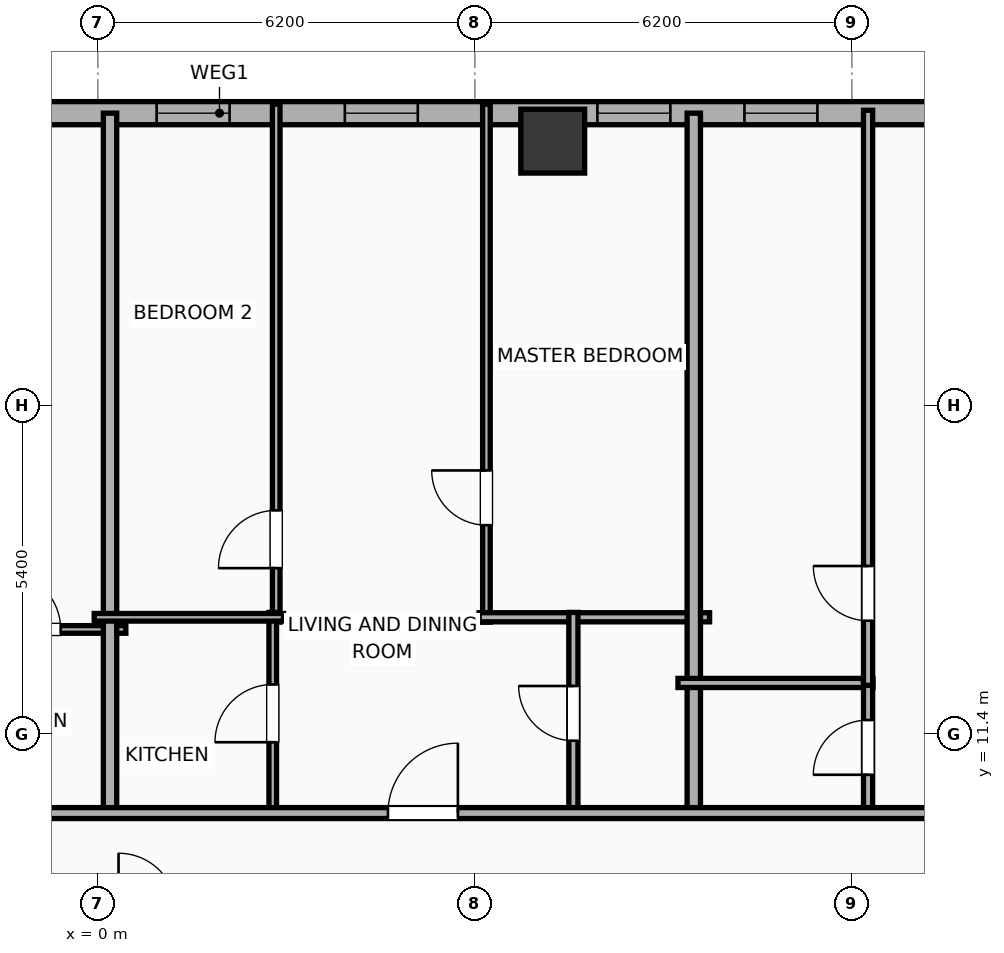
"""IFC4 building model, lengths in metres.
Left out: names, types, materials, properties, quantities, classifications, styles, units other than length and angle.
Written with IfcOpenShell. Run it as: python <this file> out.ifc"""

import sys

from ifc_helpers import new_model, si_unit, direction, frame, frame_2d, origin, origin_2d, place, context, subcontext, project, spatial, rectangle, hollow_rectangle, extrude, element, fill, save


model = new_model("IFC4")
c1 = context("Model", 3, precision=1e-05, world=origin(), true_north=direction((0.0, 1.0)))
c2 = subcontext(c1, "Body", "Model", "MODEL_VIEW")
j1 = project(units=[si_unit("LENGTHUNIT", "METRE"), si_unit("PLANEANGLEUNIT", "RADIAN")], contexts=[c1])
p1 = place(None, origin())
s1 = spatial("IfcSite", under=j1, at=p1, CompositionType="ELEMENT")
p2 = place(p1, origin())
s2 = spatial("IfcBuilding", under=s1, at=p2, CompositionType="ELEMENT")
p3 = place(p2, frame((0.0, 0.0, 101.4)))
s3 = spatial("IfcBuildingStorey", under=s2, at=p3, CompositionType="ELEMENT", Elevation=101.4)
p4 = place(p3, frame((7.48, 21.15, 0.0), z_axis=(0.0, 0.0, 1.0), x_axis=(1.0, 0.0, 0.0)))
e1 = element("IfcColumn", 1, at=p4, inside=s3, PredefinedType="COLUMN", context=c2, shape_type="SweptSolid", body=[
    extrude(hollow_rectangle(XDim=1.05, YDim=1.05, WallThickness=0.036, at=origin_2d()), origin(), (0.0, 0.0, 1.0), 3.9),
])
p5 = place(p3, frame((-25.381, 21.61, 0.0), z_axis=(0.0, 0.0, 1.0), x_axis=(1.0, 0.0, 0.0)))
e2 = element("IfcWall", 2, at=p5, inside=s3, PredefinedType="ELEMENTEDWALL", context=c2, shape_type="SweptSolid", body=[
    extrude(rectangle(XDim=54.763, YDim=0.38, at=frame_2d((27.381, 0.0))), origin(), (0.0, 0.0, 1.0), 3.65),
])
p6 = place(p5, frame((45.067, 0.0, 0.75)))
e3 = element("IfcOpeningElement", 3, at=p6, cuts=e2, PredefinedType="OPENING", context=c2, shape_type="SweptSolid", body=[
    extrude(rectangle(XDim=2.4, YDim=2.1, at=frame_2d((1.2, 1.05))), frame((0.0, 0.2, 0.0), z_axis=(0.0, -1.0, 0.0), x_axis=(1.0, 0.0, 0.0)), (0.0, 0.0, 1.0), 0.4),
])
p7 = place(p5, frame((4.076, 0.0, 0.75)))
e4 = element("IfcOpeningElement", 4, at=p7, cuts=e2, PredefinedType="OPENING", context=c2, shape_type="SweptSolid", body=[
    extrude(rectangle(XDim=1.2, YDim=2.05, at=frame_2d((0.6, 1.025))), frame((0.0, 0.2, 0.0), z_axis=(0.0, -1.0, 0.0), x_axis=(1.0, 0.0, 0.0)), (0.0, 0.0, 1.0), 0.4),
])
p8 = place(p5, frame((9.395, 0.0, 0.75)))
e5 = element("IfcOpeningElement", 5, at=p8, cuts=e2, PredefinedType="OPENING", context=c2, shape_type="SweptSolid", body=[
    extrude(rectangle(XDim=0.85, YDim=2.05, at=frame_2d((0.425, 1.025))), frame((0.0, 0.2, 0.0), z_axis=(0.0, -1.0, 0.0), x_axis=(1.0, 0.0, 0.0)), (0.0, 0.0, 1.0), 0.4),
])
p9 = place(p5, frame((7.205, 0.0, 0.75)))
e6 = element("IfcOpeningElement", 6, at=p9, cuts=e2, PredefinedType="OPENING", context=c2, shape_type="SweptSolid", body=[
    extrude(rectangle(XDim=1.2, YDim=2.05, at=frame_2d((0.6, 1.025))), frame((0.0, 0.2, 0.0), z_axis=(0.0, -1.0, 0.0), x_axis=(1.0, 0.0, 0.0)), (0.0, 0.0, 1.0), 0.4),
])
p10 = place(p5, frame((13.676, 0.0, 0.75)))
e7 = element("IfcOpeningElement", 7, at=p10, cuts=e2, PredefinedType="OPENING", context=c2, shape_type="SweptSolid", body=[
    extrude(rectangle(XDim=1.2, YDim=2.05, at=frame_2d((0.6, 1.025))), frame((0.0, 0.2, 0.0), z_axis=(0.0, -1.0, 0.0), x_axis=(1.0, 0.0, 0.0)), (0.0, 0.0, 1.0), 0.4),
])
p11 = place(p5, frame((17.136, 0.0, 0.75)))
e8 = element("IfcOpeningElement", 8, at=p11, cuts=e2, PredefinedType="OPENING", context=c2, shape_type="SweptSolid", body=[
    extrude(rectangle(XDim=1.2, YDim=2.05, at=frame_2d((0.6, 1.025))), frame((0.0, 0.2, 0.0), z_axis=(0.0, -1.0, 0.0), x_axis=(1.0, 0.0, 0.0)), (0.0, 0.0, 1.0), 0.4),
])
p12 = place(p5, frame((22.656, 0.0, 0.75)))
e9 = element("IfcOpeningElement", 9, at=p12, cuts=e2, PredefinedType="OPENING", context=c2, shape_type="SweptSolid", body=[
    extrude(rectangle(XDim=1.2, YDim=2.05, at=frame_2d((0.6, 1.025))), frame((0.0, 0.2, 0.0), z_axis=(0.0, -1.0, 0.0), x_axis=(1.0, 0.0, 0.0)), (0.0, 0.0, 1.0), 0.4),
])
p13 = place(p5, frame((29.443, 0.0, 0.75)))
e10 = element("IfcOpeningElement", 10, at=p13, cuts=e2, PredefinedType="OPENING", context=c2, shape_type="SweptSolid", body=[
    extrude(rectangle(XDim=1.2, YDim=2.05, at=frame_2d((0.6, 1.025))), frame((0.0, 0.2, 0.0), z_axis=(0.0, -1.0, 0.0), x_axis=(1.0, 0.0, 0.0)), (0.0, 0.0, 1.0), 0.4),
])
p14 = place(p5, frame((26.348, 0.0, 0.75)))
e11 = element("IfcOpeningElement", 11, at=p14, cuts=e2, PredefinedType="OPENING", context=c2, shape_type="SweptSolid", body=[
    extrude(rectangle(XDim=1.2, YDim=2.05, at=frame_2d((0.6, 1.025))), frame((0.0, 0.2, 0.0), z_axis=(0.0, -1.0, 0.0), x_axis=(1.0, 0.0, 0.0)), (0.0, 0.0, 1.0), 0.4),
])
p15 = place(p5, frame((33.596, 0.0, 0.75)))
e12 = element("IfcOpeningElement", 12, at=p15, cuts=e2, PredefinedType="OPENING", context=c2, shape_type="SweptSolid", body=[
    extrude(rectangle(XDim=1.2, YDim=2.05, at=frame_2d((0.6, 1.025))), frame((0.0, 0.2, 0.0), z_axis=(0.0, -1.0, 0.0), x_axis=(1.0, 0.0, 0.0)), (0.0, 0.0, 1.0), 0.4),
])
p16 = place(p5, frame((36.014, 0.0, 0.75)))
e13 = element("IfcOpeningElement", 13, at=p16, cuts=e2, PredefinedType="OPENING", context=c2, shape_type="SweptSolid", body=[
    extrude(rectangle(XDim=1.2, YDim=2.05, at=frame_2d((0.6, 1.025))), frame((0.0, 0.2, 0.0), z_axis=(0.0, -1.0, 0.0), x_axis=(1.0, 0.0, 0.0)), (0.0, 0.0, 1.0), 0.4),
])
p17 = place(p5, frame((40.814, 0.0, 0.75)))
e14 = element("IfcOpeningElement", 14, at=p17, cuts=e2, PredefinedType="OPENING", context=c2, shape_type="SweptSolid", body=[
    extrude(rectangle(XDim=1.2, YDim=2.05, at=frame_2d((0.6, 1.025))), frame((0.0, 0.2, 0.0), z_axis=(0.0, -1.0, 0.0), x_axis=(1.0, 0.0, 0.0)), (0.0, 0.0, 1.0), 0.4),
])
p18 = place(p5, frame((49.385, 0.0, 0.75)))
e15 = element("IfcOpeningElement", 15, at=p18, cuts=e2, PredefinedType="OPENING", context=c2, shape_type="SweptSolid", body=[
    extrude(rectangle(XDim=1.2, YDim=2.05, at=frame_2d((0.6, 1.025))), frame((0.0, 0.2, 0.0), z_axis=(0.0, -1.0, 0.0), x_axis=(1.0, 0.0, 0.0)), (0.0, 0.0, 1.0), 0.4),
])
p19 = place(p5, frame((52.181, 0.0, 0.75)))
e16 = element("IfcOpeningElement", 16, at=p19, cuts=e2, PredefinedType="OPENING", context=c2, shape_type="SweptSolid", body=[
    extrude(rectangle(XDim=1.2, YDim=2.05, at=frame_2d((0.6, 1.025))), frame((0.0, 0.2, 0.0), z_axis=(0.0, -1.0, 0.0), x_axis=(1.0, 0.0, 0.0)), (0.0, 0.0, 1.0), 0.4),
])
p20 = place(p3, frame((-2.633, 13.12, 0.0), z_axis=(0.0, 0.0, 1.0), x_axis=(1.0, 0.0, 0.0)))
e17 = element("IfcWall", 17, at=p20, inside=s3, PredefinedType="PARTITIONING", context=c2, shape_type="SweptSolid", body=[
    extrude(rectangle(XDim=3.093, YDim=0.125, at=frame_2d((1.546, 0.0))), origin(), (0.0, 0.0, 1.0), 3.65),
])
p21 = place(p20, frame((1.072, 0.0, 0.0)))
e18 = element("IfcOpeningElement", 18, at=p21, cuts=e17, PredefinedType="OPENING", context=c2, shape_type="SweptSolid", body=[
    extrude(rectangle(XDim=0.95, YDim=2.05, at=frame_2d((0.475, 1.025))), frame((0.0, 0.073, 0.0), z_axis=(0.0, -1.0, 0.0), x_axis=(1.0, 0.0, 0.0)), (0.0, 0.0, 1.0), 0.145),
])
p22 = place(p3, frame((0.2, 10.02, 0.0), z_axis=(0.0, 0.0, 1.0), x_axis=(0.0, 1.0, 0.0)))
e19 = element("IfcWall", 19, at=p22, inside=s3, PredefinedType="PARTITIONING", context=c2, shape_type="SweptSolid", body=[
    extrude(rectangle(XDim=11.59, YDim=0.22, at=frame_2d((5.795, 0.0))), origin(), (0.0, 0.0, 1.0), 3.65),
])
p23 = place(p3, frame((2.933, 13.24, 0.0), z_axis=(0.0, 0.0, 1.0), x_axis=(0.0, 1.0, 0.0)))
e20 = element("IfcWall", 20, at=p23, inside=s3, PredefinedType="PARTITIONING", context=c2, shape_type="SweptSolid", body=[
    extrude(rectangle(XDim=8.52, YDim=0.125, at=frame_2d((4.26, 0.0))), origin(), (0.0, 0.0, 1.0), 3.65),
])
p24 = place(p23, frame((0.888, 0.0, 0.0)))
e21 = element("IfcOpeningElement", 21, at=p24, cuts=e20, PredefinedType="OPENING", context=c2, shape_type="SweptSolid", body=[
    extrude(rectangle(XDim=0.95, YDim=2.05, at=frame_2d((0.475, 1.025))), frame((0.0, 0.073, 0.0), z_axis=(0.0, -1.0, 0.0), x_axis=(1.0, 0.0, 0.0)), (0.0, 0.0, 1.0), 0.145),
])
p25 = place(p3, frame((6.39, 13.24, 0.0), z_axis=(0.0, 0.0, 1.0), x_axis=(0.0, 1.0, 0.0)))
e22 = element("IfcWall", 22, at=p25, inside=s3, PredefinedType="PARTITIONING", context=c2, shape_type="SweptSolid", body=[
    extrude(rectangle(XDim=8.52, YDim=0.125, at=frame_2d((4.26, 0.0))), origin(), (0.0, 0.0, 1.0), 3.04),
])
p26 = place(p25, frame((1.595, 0.0, 0.0)))
e23 = element("IfcOpeningElement", 23, at=p26, cuts=e22, PredefinedType="OPENING", context=c2, shape_type="SweptSolid", body=[
    extrude(rectangle(XDim=0.9, YDim=2.05, at=frame_2d((0.45, 1.025))), frame((0.0, 0.073, 0.0), z_axis=(0.0, -1.0, 0.0), x_axis=(1.0, 0.0, 0.0)), (0.0, 0.0, 1.0), 0.145),
])
p27 = place(p3, frame((6.27, 13.32, 0.0), z_axis=(0.0, 0.0, 1.0), x_axis=(1.0, 0.0, 0.0)))
e24 = element("IfcWall", 24, at=p27, inside=s3, PredefinedType="PLUMBINGWALL", context=c2, shape_type="SweptSolid", body=[
    extrude(rectangle(XDim=3.79, YDim=0.15, at=frame_2d((1.895, 0.0))), origin(), (0.0, 0.0, 1.0), 3.65),
])
p28 = place(p3, frame((2.876, 10.08, 0.0), z_axis=(0.0, 0.0, 1.0), x_axis=(0.0, 1.0, 0.0)))
e25 = element("IfcWall", 25, at=p28, inside=s3, PredefinedType="PARTITIONING", context=c2, shape_type="SweptSolid", body=[
    extrude(rectangle(XDim=3.32, YDim=0.125, at=frame_2d((1.66, 0.0))), origin(), (0.0, 0.0, 1.0), 3.65),
])
p29 = place(p28, frame((1.185, 0.0, 0.0)))
e26 = element("IfcOpeningElement", 26, at=p29, cuts=e25, PredefinedType="OPENING", context=c2, shape_type="SweptSolid", body=[
    extrude(rectangle(XDim=0.95, YDim=2.05, at=frame_2d((0.475, 1.025))), frame((0.0, 0.073, 0.0), z_axis=(0.0, -1.0, 0.0), x_axis=(1.0, 0.0, 0.0)), (0.0, 0.0, 1.0), 0.145),
])
p30 = place(p3, frame((-0.06, 13.32, 0.0), z_axis=(0.0, 0.0, 1.0), x_axis=(1.0, 0.0, 0.0)))
e27 = element("IfcWall", 27, at=p30, inside=s3, PredefinedType="PARTITIONING", context=c2, shape_type="SweptSolid", body=[
    extrude(rectangle(XDim=3.113, YDim=0.125, at=frame_2d((1.557, 0.0))), origin(), (0.0, 0.0, 1.0), 3.65),
])
p31 = place(p3, frame((7.82, 10.08, 0.0), z_axis=(0.0, 0.0, 1.0), x_axis=(0.0, 1.0, 0.0)))
e28 = element("IfcWall", 28, at=p31, inside=s3, PredefinedType="PLUMBINGWALL", context=c2, shape_type="SweptSolid", body=[
    extrude(rectangle(XDim=3.32, YDim=0.15, at=frame_2d((1.66, 0.0))), origin(), (0.0, 0.0, 1.0), 3.65),
])
p32 = place(p31, frame((1.21, 0.0, 0.0)))
e29 = element("IfcOpeningElement", 29, at=p32, cuts=e28, PredefinedType="OPENING", context=c2, shape_type="SweptSolid", body=[
    extrude(rectangle(XDim=0.9, YDim=2.05, at=frame_2d((0.45, 1.025))), frame((0.0, 0.085, 0.0), z_axis=(0.0, -1.0, 0.0), x_axis=(1.0, 0.0, 0.0)), (0.0, 0.0, 1.0), 0.17),
])
p33 = place(p3, frame((9.8, 10.02, 0.0), z_axis=(0.0, 0.0, 1.0), x_axis=(0.0, 1.0, 0.0)))
e30 = element("IfcWall", 30, at=p33, inside=s3, PredefinedType="PARTITIONING", context=c2, shape_type="SweptSolid", body=[
    extrude(rectangle(XDim=11.59, YDim=0.22, at=frame_2d((5.795, 0.0))), origin(), (0.0, 0.0, 1.0), 3.65),
])
p34 = place(p3, frame((9.54, 12.24, 0.0), z_axis=(0.0, 0.0, 1.0), x_axis=(1.0, 0.0, 0.0)))
e31 = element("IfcWall", 31, at=p34, inside=s3, PredefinedType="PLUMBINGWALL", context=c2, shape_type="SweptSolid", body=[
    extrude(rectangle(XDim=3.206, YDim=0.15, at=frame_2d((1.603, 0.0))), origin(), (0.0, 0.0, 1.0), 3.65),
])
p35 = place(p3, frame((12.666, 10.08, 0.0), z_axis=(0.0, 0.0, 1.0), x_axis=(0.0, 1.0, 0.0)))
e32 = element("IfcWall", 32, at=p35, inside=s3, PredefinedType="PLUMBINGWALL", context=c2, shape_type="SweptSolid", body=[
    extrude(rectangle(XDim=2.2, YDim=0.15, at=frame_2d((1.1, 0.0))), origin(), (0.0, 0.0, 1.0), 3.65),
])
p36 = place(p35, frame((0.65, 0.0, 0.0)))
e33 = element("IfcOpeningElement", 33, at=p36, cuts=e32, PredefinedType="OPENING", context=c2, shape_type="SweptSolid", body=[
    extrude(rectangle(XDim=0.9, YDim=2.05, at=frame_2d((0.45, 1.025))), frame((0.0, 0.085, 0.0), z_axis=(0.0, -1.0, 0.0), x_axis=(1.0, 0.0, 0.0)), (0.0, 0.0, 1.0), 0.17),
])
p37 = place(p3, frame((12.666, 12.2, 0.0), z_axis=(0.0, 0.0, 1.0), x_axis=(0.0, 1.0, 0.0)))
e34 = element("IfcWall", 34, at=p37, inside=s3, PredefinedType="PLUMBINGWALL", context=c2, shape_type="SweptSolid", body=[
    extrude(rectangle(XDim=9.458, YDim=0.15, at=frame_2d((4.729, 0.0))), origin(), (0.0, 0.0, 1.0), 3.65),
])
p38 = place(p37, frame((1.063, 0.0, 0.0)))
e35 = element("IfcOpeningElement", 35, at=p38, cuts=e34, PredefinedType="OPENING", context=c2, shape_type="SweptSolid", body=[
    extrude(rectangle(XDim=0.9, YDim=2.05, at=frame_2d((0.45, 1.025))), frame((0.0, 0.085, 0.0), z_axis=(0.0, -1.0, 0.0), x_axis=(1.0, 0.0, 0.0)), (0.0, 0.0, 1.0), 0.17),
])
p39 = place(p3, frame((-29.21, 10.1, 0.0), z_axis=(0.0, 0.0, 1.0), x_axis=(1.0, 0.0, 0.0)))
e36 = element("IfcWall", 36, at=p39, inside=s3, PredefinedType="PARTITIONING", context=c2, shape_type="SweptSolid", body=[
    extrude(rectangle(XDim=62.42, YDim=0.18, at=frame_2d((31.21, 0.0))), origin(), (0.0, 0.0, 1.0), 3.65),
])
p40 = place(p39, frame((4.906, 0.0, 0.0)))
e37 = element("IfcOpeningElement", 37, at=p40, cuts=e36, PredefinedType="OPENING", context=c2, shape_type="SweptSolid", body=[
    extrude(rectangle(XDim=1.15, YDim=2.05, at=frame_2d((0.575, 1.025))), frame((0.0, 0.1, 0.0), z_axis=(0.0, -1.0, 0.0), x_axis=(1.0, 0.0, 0.0)), (0.0, 0.0, 1.0), 0.2),
])
p41 = place(p39, frame((14.812, 0.0, 0.0)))
e38 = element("IfcOpeningElement", 38, at=p41, cuts=e36, PredefinedType="OPENING", context=c2, shape_type="SweptSolid", body=[
    extrude(rectangle(XDim=1.15, YDim=2.05, at=frame_2d((0.575, 1.025))), frame((0.0, 0.1, 0.0), z_axis=(0.0, -1.0, 0.0), x_axis=(1.0, 0.0, 0.0)), (0.0, 0.0, 1.0), 0.2),
])
p42 = place(p39, frame((24.406, 0.0, 0.0)))
e39 = element("IfcOpeningElement", 39, at=p42, cuts=e36, PredefinedType="OPENING", context=c2, shape_type="SweptSolid", body=[
    extrude(rectangle(XDim=1.15, YDim=2.05, at=frame_2d((0.575, 1.025))), frame((0.0, 0.1, 0.0), z_axis=(0.0, -1.0, 0.0), x_axis=(1.0, 0.0, 0.0)), (0.0, 0.0, 1.0), 0.2),
])
p43 = place(p39, frame((33.981, 0.0, 0.0)))
e40 = element("IfcOpeningElement", 40, at=p43, cuts=e36, PredefinedType="OPENING", context=c2, shape_type="SweptSolid", body=[
    extrude(rectangle(XDim=1.15, YDim=2.05, at=frame_2d((0.575, 1.025))), frame((0.0, 0.1, 0.0), z_axis=(0.0, -1.0, 0.0), x_axis=(1.0, 0.0, 0.0)), (0.0, 0.0, 1.0), 0.2),
])
p44 = place(p39, frame((43.138, 0.0, 0.0)))
e41 = element("IfcOpeningElement", 41, at=p44, cuts=e36, PredefinedType="OPENING", context=c2, shape_type="SweptSolid", body=[
    extrude(rectangle(XDim=1.15, YDim=2.05, at=frame_2d((0.575, 1.025))), frame((0.0, 0.1, 0.0), z_axis=(0.0, -1.0, 0.0), x_axis=(1.0, 0.0, 0.0)), (0.0, 0.0, 1.0), 0.2),
])
p45 = place(p39, frame((51.777, 0.0, 0.0)))
e42 = element("IfcOpeningElement", 42, at=p45, cuts=e36, PredefinedType="OPENING", context=c2, shape_type="SweptSolid", body=[
    extrude(rectangle(XDim=0.9, YDim=2.05, at=frame_2d((0.45, 1.025))), frame((0.0, 0.1, 0.0), z_axis=(0.0, -1.0, 0.0), x_axis=(1.0, 0.0, 0.0)), (0.0, 0.0, 1.0), 0.2),
])
p46 = place(p39, frame((58.718, 0.0, 0.0)))
e43 = element("IfcOpeningElement", 43, at=p46, cuts=e36, PredefinedType="OPENING", context=c2, shape_type="SweptSolid", body=[
    extrude(rectangle(XDim=0.9, YDim=2.05, at=frame_2d((0.45, 1.025))), frame((0.0, 0.1, 0.0), z_axis=(0.0, -1.0, 0.0), x_axis=(1.0, 0.0, 0.0)), (0.0, 0.0, 1.0), 0.2),
])
p47 = place(p13, origin())
e44 = element("IfcWindow", 44, at=p47, inside=s3, PartitioningType="SINGLE_PANEL", PredefinedType="WINDOW", context=c2, shape_type="SweptSolid", body=[
    extrude(rectangle(XDim=1.2, YDim=2.05, at=frame_2d((0.6, 1.025))), frame((0.0, 0.03, 0.0), z_axis=(0.0, -1.0, 0.0), x_axis=(1.0, 0.0, 0.0)), (0.0, 0.0, 1.0), 0.06),
])
fill(e10, e44)
p48 = place(p14, origin())
e45 = element("IfcWindow", 45, at=p48, inside=s3, PartitioningType="SINGLE_PANEL", PredefinedType="WINDOW", context=c2, shape_type="SweptSolid", body=[
    extrude(rectangle(XDim=1.2, YDim=2.05, at=frame_2d((0.6, 1.025))), frame((0.0, 0.03, 0.0), z_axis=(0.0, -1.0, 0.0), x_axis=(1.0, 0.0, 0.0)), (0.0, 0.0, 1.0), 0.06),
])
fill(e11, e45)
p49 = place(p15, origin())
e46 = element("IfcWindow", 46, at=p49, inside=s3, PartitioningType="SINGLE_PANEL", PredefinedType="WINDOW", context=c2, shape_type="SweptSolid", body=[
    extrude(rectangle(XDim=1.2, YDim=2.05, at=frame_2d((0.6, 1.025))), frame((0.0, 0.03, 0.0), z_axis=(0.0, -1.0, 0.0), x_axis=(1.0, 0.0, 0.0)), (0.0, 0.0, 1.0), 0.06),
])
fill(e12, e46)
p50 = place(p16, origin())
e47 = element("IfcWindow", 47, at=p50, inside=s3, PartitioningType="SINGLE_PANEL", PredefinedType="WINDOW", context=c2, shape_type="SweptSolid", body=[
    extrude(rectangle(XDim=1.2, YDim=2.05, at=frame_2d((0.6, 1.025))), frame((0.0, 0.03, 0.0), z_axis=(0.0, -1.0, 0.0), x_axis=(1.0, 0.0, 0.0)), (0.0, 0.0, 1.0), 0.06),
])
fill(e13, e47)
p51 = place(p21, origin())
e48 = element("IfcDoor", 48, at=p51, inside=s3, OperationType="SINGLE_SWING_LEFT", PredefinedType="DOOR", context=c2, shape_type="SweptSolid", body=[
    extrude(rectangle(XDim=0.95, YDim=2.05, at=frame_2d((0.475, 1.025))), frame((0.0, 0.025, 0.0), z_axis=(0.0, -1.0, 0.0), x_axis=(1.0, 0.0, 0.0)), (0.0, 0.0, 1.0), 0.05),
])
fill(e18, e48)
p52 = place(p24, origin())
e49 = element("IfcDoor", 49, at=p52, inside=s3, OperationType="SINGLE_SWING_LEFT", PredefinedType="DOOR", context=c2, shape_type="SweptSolid", body=[
    extrude(rectangle(XDim=0.95, YDim=2.05, at=frame_2d((0.475, 1.025))), frame((0.0, 0.025, 0.0), z_axis=(0.0, -1.0, 0.0), x_axis=(1.0, 0.0, 0.0)), (0.0, 0.0, 1.0), 0.05),
])
fill(e21, e49)
p53 = place(p26, origin())
e50 = element("IfcDoor", 50, at=p53, inside=s3, OperationType="SINGLE_SWING_RIGHT", PredefinedType="DOOR", context=c2, shape_type="SweptSolid", body=[
    extrude(rectangle(XDim=0.9, YDim=2.05, at=frame_2d((0.45, 1.025))), frame((0.0, 0.025, 0.0), z_axis=(0.0, -1.0, 0.0), x_axis=(1.0, 0.0, 0.0)), (0.0, 0.0, 1.0), 0.05),
])
fill(e23, e50)
p54 = place(p29, origin())
e51 = element("IfcDoor", 51, at=p54, inside=s3, OperationType="SINGLE_SWING_LEFT", PredefinedType="DOOR", context=c2, shape_type="SweptSolid", body=[
    extrude(rectangle(XDim=0.95, YDim=2.05, at=frame_2d((0.475, 1.025))), frame((0.0, 0.025, 0.0), z_axis=(0.0, -1.0, 0.0), x_axis=(1.0, 0.0, 0.0)), (0.0, 0.0, 1.0), 0.05),
])
fill(e26, e51)
p55 = place(p32, origin())
e52 = element("IfcDoor", 52, at=p55, inside=s3, OperationType="SINGLE_SWING_RIGHT", PredefinedType="DOOR", context=c2, shape_type="SweptSolid", body=[
    extrude(rectangle(XDim=0.9, YDim=2.05, at=frame_2d((0.45, 1.025))), frame((0.0, 0.025, 0.0), z_axis=(0.0, -1.0, 0.0), x_axis=(1.0, 0.0, 0.0)), (0.0, 0.0, 1.0), 0.05),
])
fill(e29, e52)
p56 = place(p36, origin())
e53 = element("IfcDoor", 53, at=p56, inside=s3, OperationType="SINGLE_SWING_LEFT", PredefinedType="DOOR", context=c2, shape_type="SweptSolid", body=[
    extrude(rectangle(XDim=0.9, YDim=2.05, at=frame_2d((0.45, 1.025))), frame((0.0, 0.025, 0.0), z_axis=(0.0, -1.0, 0.0), x_axis=(1.0, 0.0, 0.0)), (0.0, 0.0, 1.0), 0.05),
])
fill(e33, e53)
p57 = place(p38, origin())
e54 = element("IfcDoor", 54, at=p57, inside=s3, OperationType="SINGLE_SWING_RIGHT", PredefinedType="DOOR", context=c2, shape_type="SweptSolid", body=[
    extrude(rectangle(XDim=0.9, YDim=2.05, at=frame_2d((0.45, 1.025))), frame((0.0, 0.025, 0.0), z_axis=(0.0, -1.0, 0.0), x_axis=(1.0, 0.0, 0.0)), (0.0, 0.0, 1.0), 0.05),
])
fill(e35, e54)
p58 = place(p43, origin())
e55 = element("IfcDoor", 55, at=p58, inside=s3, OperationType="SINGLE_SWING_RIGHT", PredefinedType="DOOR", context=c2, shape_type="SweptSolid", body=[
    extrude(rectangle(XDim=1.15, YDim=2.05, at=frame_2d((0.575, 1.025))), frame((0.0, 0.025, 0.0), z_axis=(0.0, -1.0, 0.0), x_axis=(1.0, 0.0, 0.0)), (0.0, 0.0, 1.0), 0.05),
])
fill(e40, e55)
save(model, sys.argv[1])
